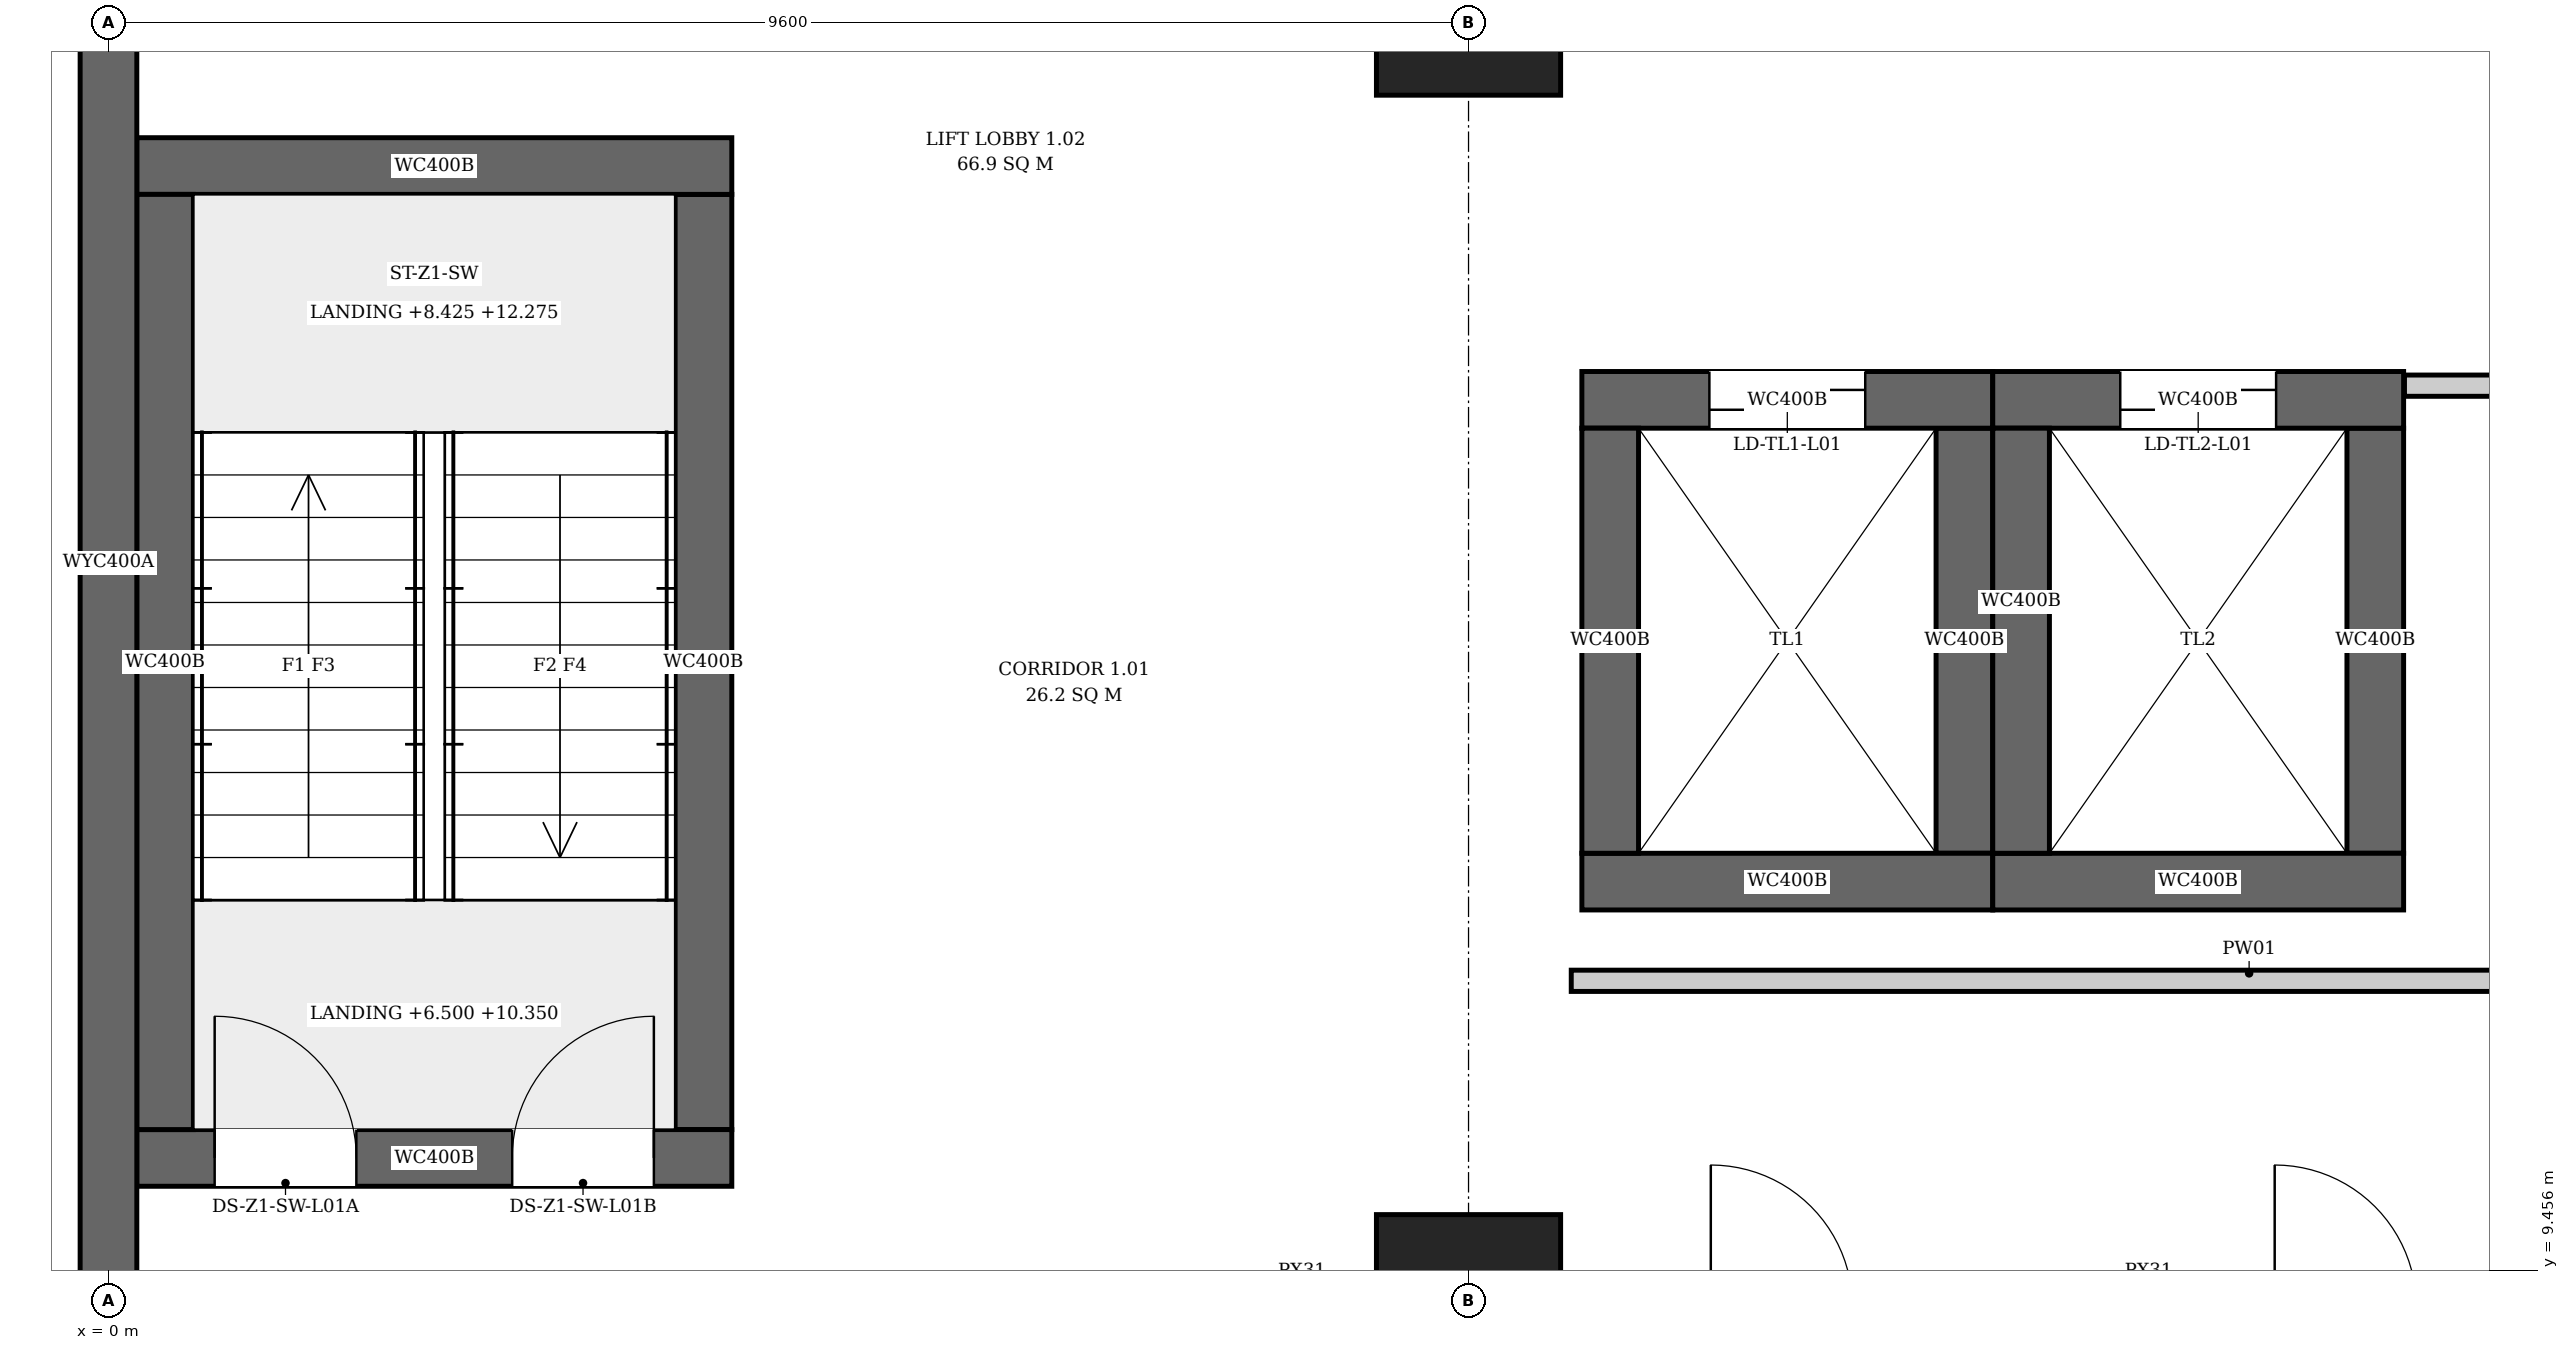
"""IFC4 building model, lengths in metres.
Left out: names, types, materials, properties, quantities, classifications, styles, units other than length and angle.
Written with IfcOpenShell. Run it as: python <this file> out.ifc"""

import sys

from ifc_helpers import new_model, si_unit, direction, frame, frame_2d, origin, origin_2d, place, context, subcontext, project, spatial, rectangle, extrude, element, fill, save


model = new_model("IFC4")
c1 = context("Model", 3, precision=1e-05, world=origin(), true_north=direction((0.0, 1.0)))
c2 = subcontext(c1, "Body", "Model", "MODEL_VIEW")
j1 = project(units=[si_unit("LENGTHUNIT", "METRE"), si_unit("PLANEANGLEUNIT", "RADIAN")], contexts=[c1])
p1 = place(None, origin())
s1 = spatial("IfcSite", under=j1, at=p1, CompositionType="ELEMENT")
p2 = place(p1, origin())
s2 = spatial("IfcBuilding", under=s1, at=p2, CompositionType="ELEMENT")
p3 = place(p2, frame((0.0, 0.0, 6.5)))
s3 = spatial("IfcBuildingStorey", under=s2, at=p3, CompositionType="ELEMENT", Elevation=6.5)
p4 = place(p3, frame((0.0, -0.2, 0.0), z_axis=(0.0, 0.0, 1.0), x_axis=(0.0, 1.0, 0.0)))
e1 = element("IfcWall", 1, at=p4, inside=s3, PredefinedType="SHEAR", context=c2, shape_type="SweptSolid", body=[
    extrude(rectangle(XDim=46.88, YDim=0.4, at=frame_2d((23.44, 0.0))), origin(), (0.0, 0.0, 1.0), 7.7),
])
p5 = place(p3, frame((0.2, 10.25, 0.0), z_axis=(0.0, 0.0, 1.0), x_axis=(1.0, 0.0, 0.0)))
e2 = element("IfcWall", 2, at=p5, inside=s3, PredefinedType="SHEAR", context=c2, shape_type="SweptSolid", body=[
    extrude(rectangle(XDim=4.2, YDim=0.4, at=frame_2d((2.1, 0.0))), origin(), (0.0, 0.0, 1.0), 7.7),
])
p6 = place(p5, frame((0.55, 0.0, 0.0)))
e3 = element("IfcOpeningElement", 3, at=p6, cuts=e2, PredefinedType="OPENING", context=c2, shape_type="SweptSolid", body=[
    extrude(rectangle(XDim=1.0, YDim=2.1, at=frame_2d((0.5, 1.05))), frame((0.0, 0.21, 0.0), z_axis=(0.0, -1.0, 0.0), x_axis=(1.0, 0.0, 0.0)), (0.0, 0.0, 1.0), 0.42),
])
p7 = place(p5, frame((2.65, 0.0, 0.0)))
e4 = element("IfcOpeningElement", 4, at=p7, cuts=e2, PredefinedType="OPENING", context=c2, shape_type="SweptSolid", body=[
    extrude(rectangle(XDim=1.0, YDim=2.1, at=frame_2d((0.5, 1.05))), frame((0.0, 0.21, 0.0), z_axis=(0.0, -1.0, 0.0), x_axis=(1.0, 0.0, 0.0)), (0.0, 0.0, 1.0), 0.42),
])
p8 = place(p3, frame((0.2, 17.25, 0.0), z_axis=(0.0, 0.0, 1.0), x_axis=(1.0, 0.0, 0.0)))
e5 = element("IfcWall", 5, at=p8, inside=s3, PredefinedType="SHEAR", context=c2, shape_type="SweptSolid", body=[
    extrude(rectangle(XDim=4.2, YDim=0.4, at=frame_2d((2.1, 0.0))), origin(), (0.0, 0.0, 1.0), 7.7),
])
for number, where, z_axis, x_axis in (
    (6, (0.4, 10.45, 0.0), (0.0, 0.0, 1.0), (0.0, 1.0, 0.0)),
    (7, (4.2, 10.45, 0.0), (0.0, 0.0, 1.0), (0.0, 1.0, 0.0)),
):
    element("IfcWall", number, at=place(p3, frame(where, z_axis=z_axis, x_axis=x_axis)), inside=s3, PredefinedType="SHEAR", context=c2, shape_type="SweptSolid", body=[
        extrude(rectangle(XDim=6.6, YDim=0.4, at=frame_2d((3.3, 0.0))), origin(), (0.0, 0.0, 1.0), 7.7),
    ])
p9 = place(p3, frame((10.4, 12.2, 0.0), z_axis=(0.0, 0.0, 1.0), x_axis=(1.0, 0.0, 0.0)))
e8 = element("IfcWall", 8, at=p9, inside=s3, PredefinedType="SHEAR", context=c2, shape_type="SweptSolid", body=[
    extrude(rectangle(XDim=2.9, YDim=0.4, at=frame_2d((1.45, 0.0))), origin(), (0.0, 0.0, 1.0), 7.7),
])
p10 = place(p3, frame((10.4, 15.6, 0.0), z_axis=(0.0, 0.0, 1.0), x_axis=(1.0, 0.0, 0.0)))
e9 = element("IfcWall", 9, at=p10, inside=s3, PredefinedType="SHEAR", context=c2, shape_type="SweptSolid", body=[
    extrude(rectangle(XDim=2.9, YDim=0.4, at=frame_2d((1.45, 0.0))), origin(), (0.0, 0.0, 1.0), 7.7),
])
p11 = place(p10, frame((0.9, 0.0, 0.0)))
e10 = element("IfcOpeningElement", 10, at=p11, cuts=e9, PredefinedType="OPENING", context=c2, shape_type="SweptSolid", body=[
    extrude(rectangle(XDim=1.1, YDim=2.1, at=frame_2d((0.55, 1.05))), frame((0.0, 0.21, 0.0), z_axis=(0.0, -1.0, 0.0), x_axis=(1.0, 0.0, 0.0)), (0.0, 0.0, 1.0), 0.42),
])
for number, where, z_axis, x_axis in (
    (11, (10.6, 12.4, 0.0), (0.0, 0.0, 1.0), (0.0, 1.0, 0.0)),
    (12, (13.1, 12.4, 0.0), (0.0, 0.0, 1.0), (0.0, 1.0, 0.0)),
):
    element("IfcWall", number, at=place(p3, frame(where, z_axis=z_axis, x_axis=x_axis)), inside=s3, PredefinedType="SHEAR", context=c2, shape_type="SweptSolid", body=[
        extrude(rectangle(XDim=3.0, YDim=0.4, at=frame_2d((1.5, 0.0))), origin(), (0.0, 0.0, 1.0), 7.7),
    ])
p12 = place(p3, frame((13.3, 12.2, 0.0), z_axis=(0.0, 0.0, 1.0), x_axis=(1.0, 0.0, 0.0)))
e13 = element("IfcWall", 13, at=p12, inside=s3, PredefinedType="SHEAR", context=c2, shape_type="SweptSolid", body=[
    extrude(rectangle(XDim=2.9, YDim=0.4, at=frame_2d((1.45, 0.0))), origin(), (0.0, 0.0, 1.0), 7.7),
])
p13 = place(p3, frame((13.3, 15.6, 0.0), z_axis=(0.0, 0.0, 1.0), x_axis=(1.0, 0.0, 0.0)))
e14 = element("IfcWall", 14, at=p13, inside=s3, PredefinedType="SHEAR", context=c2, shape_type="SweptSolid", body=[
    extrude(rectangle(XDim=2.9, YDim=0.4, at=frame_2d((1.45, 0.0))), origin(), (0.0, 0.0, 1.0), 7.7),
])
p14 = place(p13, frame((0.9, 0.0, 0.0)))
e15 = element("IfcOpeningElement", 15, at=p14, cuts=e14, PredefinedType="OPENING", context=c2, shape_type="SweptSolid", body=[
    extrude(rectangle(XDim=1.1, YDim=2.1, at=frame_2d((0.55, 1.05))), frame((0.0, 0.21, 0.0), z_axis=(0.0, -1.0, 0.0), x_axis=(1.0, 0.0, 0.0)), (0.0, 0.0, 1.0), 0.42),
])
for number, where, z_axis, x_axis in (
    (16, (13.5, 12.4, 0.0), (0.0, 0.0, 1.0), (0.0, 1.0, 0.0)),
    (17, (16.0, 12.4, 0.0), (0.0, 0.0, 1.0), (0.0, 1.0, 0.0)),
):
    element("IfcWall", number, at=place(p3, frame(where, z_axis=z_axis, x_axis=x_axis)), inside=s3, PredefinedType="SHEAR", context=c2, shape_type="SweptSolid", body=[
        extrude(rectangle(XDim=3.0, YDim=0.4, at=frame_2d((1.5, 0.0))), origin(), (0.0, 0.0, 1.0), 7.7),
    ])
for number, where, z_axis, x_axis in (
    (18, (9.6, 9.2, 0.0), (0.0, 0.0, 1.0), (1.0, 0.0, 0.0)),
    (19, (9.6, 18.4, 0.0), (0.0, 0.0, 1.0), (1.0, 0.0, 0.0)),
):
    element("IfcColumn", number, at=place(p3, frame(where, z_axis=z_axis, x_axis=x_axis)), inside=s3, PredefinedType="COLUMN", context=c2, shape_type="SweptSolid", body=[
        extrude(rectangle(XDim=1.3, YDim=1.3, at=origin_2d()), origin(), (0.0, 0.0, 1.0), 7.7),
    ])
p15 = place(p3, frame((10.325, 11.5, 0.0), z_axis=(0.0, 0.0, 1.0), x_axis=(1.0, 0.0, 0.0)))
e20 = element("IfcWall", 20, at=p15, inside=s3, PredefinedType="PARTITIONING", context=c2, shape_type="SweptSolid", body=[
    extrude(rectangle(XDim=9.569, YDim=0.15, at=frame_2d((4.785, 0.0))), origin(), (0.0, 0.0, 1.0), 7.35),
])
p16 = place(p3, frame((16.206, 15.7, 0.0), z_axis=(0.0, 0.0, 1.0), x_axis=(1.0, 0.0, 0.0)))
e21 = element("IfcWall", 21, at=p16, inside=s3, PredefinedType="PARTITIONING", context=c2, shape_type="SweptSolid", body=[
    extrude(rectangle(XDim=3.688, YDim=0.15, at=frame_2d((1.844, 0.0))), origin(), (0.0, 0.0, 1.0), 7.35),
])
p17 = place(p6, origin())
e22 = element("IfcDoor", 22, at=p17, inside=s3, OperationType="SINGLE_SWING_RIGHT", PredefinedType="DOOR", context=c2, shape_type="SweptSolid", body=[
    extrude(rectangle(XDim=1.0, YDim=2.1, at=frame_2d((0.5, 1.05))), frame((0.0, 0.025, 0.0), z_axis=(0.0, -1.0, 0.0), x_axis=(1.0, 0.0, 0.0)), (0.0, 0.0, 1.0), 0.05),
])
fill(e3, e22)
p18 = place(p7, origin())
e23 = element("IfcDoor", 23, at=p18, inside=s3, OperationType="SINGLE_SWING_LEFT", PredefinedType="DOOR", context=c2, shape_type="SweptSolid", body=[
    extrude(rectangle(XDim=1.0, YDim=2.1, at=frame_2d((0.5, 1.05))), frame((0.0, 0.025, 0.0), z_axis=(0.0, -1.0, 0.0), x_axis=(1.0, 0.0, 0.0)), (0.0, 0.0, 1.0), 0.05),
])
fill(e4, e23)
p19 = place(p11, origin())
e24 = element("IfcDoor", 24, at=p19, inside=s3, OperationType="DOUBLE_DOOR_SLIDING", PredefinedType="DOOR", context=c2, shape_type="SweptSolid", body=[
    extrude(rectangle(XDim=1.1, YDim=2.1, at=frame_2d((0.55, 1.05))), frame((0.0, 0.025, 0.0), z_axis=(0.0, -1.0, 0.0), x_axis=(1.0, 0.0, 0.0)), (0.0, 0.0, 1.0), 0.05),
])
fill(e10, e24)
p20 = place(p14, origin())
e25 = element("IfcDoor", 25, at=p20, inside=s3, OperationType="DOUBLE_DOOR_SLIDING", PredefinedType="DOOR", context=c2, shape_type="SweptSolid", body=[
    extrude(rectangle(XDim=1.1, YDim=2.1, at=frame_2d((0.55, 1.05))), frame((0.0, 0.025, 0.0), z_axis=(0.0, -1.0, 0.0), x_axis=(1.0, 0.0, 0.0)), (0.0, 0.0, 1.0), 0.05),
])
fill(e15, e25)
save(model, sys.argv[1])
